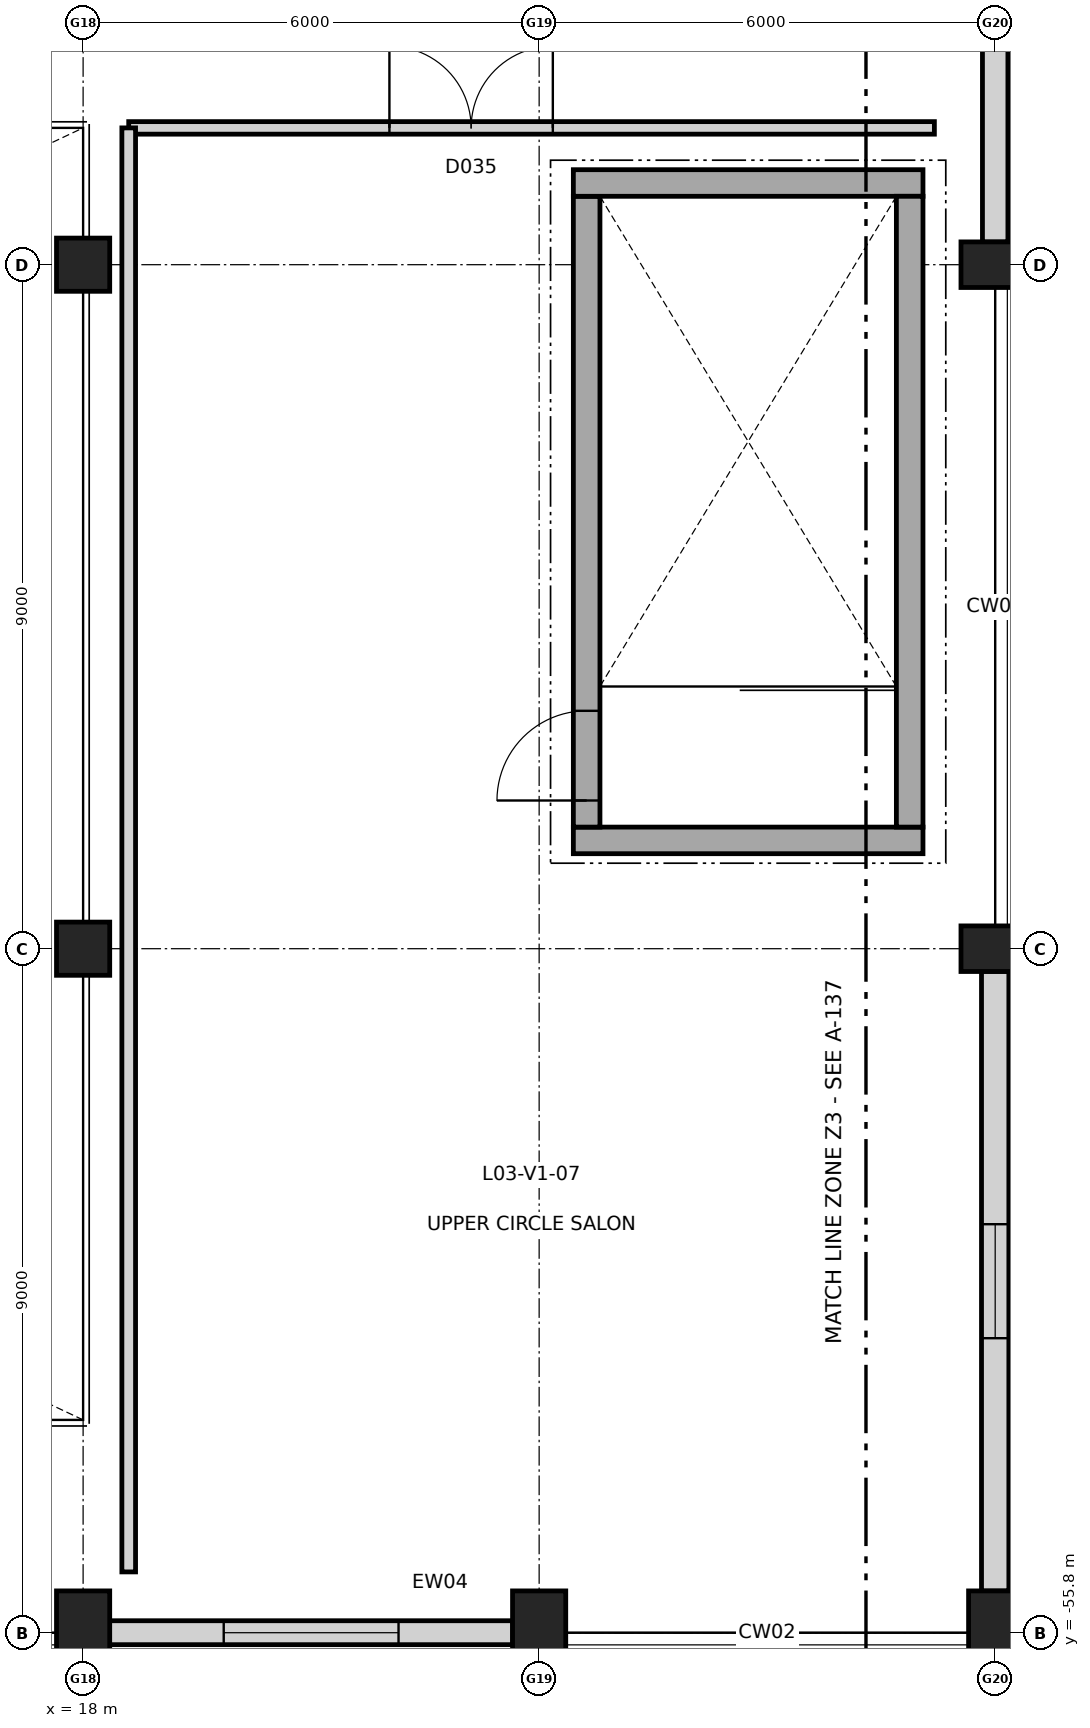
"""IFC4 building model, lengths in metres.
Left out: names, types, materials, properties, quantities, classifications, styles, units other than length and angle.
Written with IfcOpenShell. Run it as: python <this file> out.ifc"""

import sys

from ifc_helpers import new_model, si_unit, direction, frame, frame_2d, origin, origin_2d, place, context, subcontext, project, spatial, rectangle, circle, extrude, element, fill, save


model = new_model("IFC4")
c1 = context("Model", 3, precision=1e-05, world=origin(), true_north=direction((0.0, 1.0)))
c2 = subcontext(c1, "Body", "Model", "MODEL_VIEW")
j1 = project(units=[si_unit("LENGTHUNIT", "METRE"), si_unit("PLANEANGLEUNIT", "RADIAN")], contexts=[c1])
p1 = place(None, origin())
s1 = spatial("IfcSite", under=j1, at=p1, CompositionType="ELEMENT")
p2 = place(p1, origin())
s2 = spatial("IfcBuilding", under=s1, at=p2, CompositionType="ELEMENT")
p3 = place(p2, frame((0.0, 0.0, 15.0)))
s3 = spatial("IfcBuildingStorey", under=s2, at=p3, CompositionType="ELEMENT", Elevation=15.0)
p4 = place(p3, frame((18.0, -55.8, 0.0), z_axis=(0.0, 0.0, 1.0), x_axis=(1.0, 0.0, 0.0)))
e1 = element("IfcColumn", 1, at=p4, inside=s3, PredefinedType="COLUMN", context=c2, shape_type="SweptSolid", body=[
    extrude(rectangle(XDim=0.7, YDim=1.1, at=origin_2d()), origin(), (0.0, 0.0, 1.0), 4.8),
])
for number, where, z_axis, x_axis in (
    (2, (18.0, -46.8, 0.0), (0.0, 0.0, 1.0), (1.0, 0.0, 0.0)),
    (3, (18.0, -37.8, 0.0), (0.0, 0.0, 1.0), (1.0, 0.0, 0.0)),
):
    element("IfcColumn", number, at=place(p3, frame(where, z_axis=z_axis, x_axis=x_axis)), inside=s3, PredefinedType="COLUMN", context=c2, shape_type="SweptSolid", body=[
        extrude(circle(Radius=0.35, at=origin_2d()), origin(), (0.0, 0.0, 1.0), 4.8),
    ])
for number, where, z_axis, x_axis in (
    (4, (24.0, -55.8, 0.0), (0.0, 0.0, 1.0), (1.0, 0.0, 0.0)),
    (5, (30.0, -55.8, 0.0), (0.0, 0.0, 1.0), (1.0, 0.0, 0.0)),
):
    element("IfcColumn", number, at=place(p3, frame(where, z_axis=z_axis, x_axis=x_axis)), inside=s3, PredefinedType="COLUMN", context=c2, shape_type="SweptSolid", body=[
        extrude(rectangle(XDim=0.7, YDim=1.1, at=origin_2d()), origin(), (0.0, 0.0, 1.0), 4.8),
    ])
for number, where, z_axis, x_axis in (
    (6, (30.0, -46.8, 0.0), (0.0, 0.0, 1.0), (0.0, 1.0, 0.0)),
    (7, (30.0, -37.8, 0.0), (0.0, 0.0, 1.0), (0.0, 1.0, 0.0)),
):
    element("IfcColumn", number, at=place(p3, frame(where, z_axis=z_axis, x_axis=x_axis)), inside=s3, PredefinedType="COLUMN", context=c2, shape_type="SweptSolid", body=[
        extrude(rectangle(XDim=0.6, YDim=0.9, at=origin_2d()), origin(), (0.0, 0.0, 1.0), 4.8),
    ])
p5 = place(p3, frame((23.652, -55.8, 0.0), z_axis=(0.0, 0.0, 1.0), x_axis=(-1.0, 0.0, 0.0)))
e8 = element("IfcWall", 8, at=p5, inside=s3, PredefinedType="STANDARD", context=c2, shape_type="SweptSolid", body=[
    extrude(rectangle(XDim=5.304, YDim=0.315, at=frame_2d((2.652, 0.0))), origin(), (0.0, 0.0, 1.0), 3.745),
])
p6 = place(p5, frame((1.502, 0.0, 0.85)))
e9 = element("IfcOpeningElement", 9, at=p6, cuts=e8, PredefinedType="OPENING", context=c2, shape_type="SweptSolid", body=[
    extrude(rectangle(XDim=2.3, YDim=1.85, at=frame_2d((1.15, 0.925))), frame((0.0, 0.167, 0.0), z_axis=(0.0, -1.0, 0.0), x_axis=(1.0, 0.0, 0.0)), (0.0, 0.0, 1.0), 0.335),
])
p7 = place(p3, frame((30.0, -29.098, 0.0), z_axis=(0.0, 0.0, 1.0), x_axis=(0.0, -1.0, 0.0)))
e10 = element("IfcWall", 10, at=p7, inside=s3, PredefinedType="STANDARD", context=c2, shape_type="SweptSolid", body=[
    extrude(rectangle(XDim=8.404, YDim=0.335, at=frame_2d((4.202, 0.0))), origin(), (0.0, 0.0, 1.0), 3.829),
])
p8 = place(p7, frame((2.652, 0.0, 0.85)))
e11 = element("IfcOpeningElement", 11, at=p8, cuts=e10, PredefinedType="OPENING", context=c2, shape_type="SweptSolid", body=[
    extrude(rectangle(XDim=3.1, YDim=2.1, at=frame_2d((1.55, 1.05))), frame((0.0, 0.177, 0.0), z_axis=(0.0, -1.0, 0.0), x_axis=(1.0, 0.0, 0.0)), (0.0, 0.0, 1.0), 0.355),
])
p9 = place(p3, frame((30.0, -47.098, 0.0), z_axis=(0.0, 0.0, 1.0), x_axis=(0.0, -1.0, 0.0)))
e12 = element("IfcWall", 12, at=p9, inside=s3, PredefinedType="STANDARD", context=c2, shape_type="SweptSolid", body=[
    extrude(rectangle(XDim=8.154, YDim=0.36, at=frame_2d((4.077, 0.0))), origin(), (0.0, 0.0, 1.0), 3.829),
])
p10 = place(p9, frame((3.327, 0.0, 0.6)))
e13 = element("IfcOpeningElement", 13, at=p10, cuts=e12, PredefinedType="OPENING", context=c2, shape_type="SweptSolid", body=[
    extrude(rectangle(XDim=1.5, YDim=2.35, at=frame_2d((0.75, 1.175))), frame((0.0, 0.19, 0.0), z_axis=(0.0, -1.0, 0.0), x_axis=(1.0, 0.0, 0.0)), (0.0, 0.0, 1.0), 0.38),
])
p11 = place(p3, frame((29.05, -45.375, 0.0), z_axis=(0.0, 0.0, 1.0), x_axis=(-1.0, 0.0, 0.0)))
e14 = element("IfcWall", 14, at=p11, inside=s3, PredefinedType="SHEAR", context=c2, shape_type="SweptSolid", body=[
    extrude(rectangle(XDim=4.6, YDim=0.35, at=frame_2d((2.3, 0.0))), origin(), (0.0, 0.0, 1.0), 4.8),
])
p12 = place(p3, frame((24.625, -45.2, 0.0), z_axis=(0.0, 0.0, 1.0), x_axis=(0.0, 1.0, 0.0)))
e15 = element("IfcWall", 15, at=p12, inside=s3, PredefinedType="SHEAR", context=c2, shape_type="SweptSolid", body=[
    extrude(rectangle(XDim=8.3, YDim=0.35, at=frame_2d((4.15, 0.0))), origin(), (0.0, 0.0, 1.0), 4.8),
])
p13 = place(p12, frame((0.35, 0.0, 0.0)))
e16 = element("IfcOpeningElement", 16, at=p13, cuts=e15, PredefinedType="OPENING", context=c2, shape_type="SweptSolid", body=[
    extrude(rectangle(XDim=1.18, YDim=2.15, at=frame_2d((0.59, 1.075))), frame((0.0, 0.185, 0.0), z_axis=(0.0, -1.0, 0.0), x_axis=(1.0, 0.0, 0.0)), (0.0, 0.0, 1.0), 0.37),
])
p14 = place(p3, frame((24.45, -36.725, 0.0), z_axis=(0.0, 0.0, 1.0), x_axis=(1.0, 0.0, 0.0)))
e17 = element("IfcWall", 17, at=p14, inside=s3, PredefinedType="SHEAR", context=c2, shape_type="SweptSolid", body=[
    extrude(rectangle(XDim=4.6, YDim=0.35, at=frame_2d((2.3, 0.0))), origin(), (0.0, 0.0, 1.0), 4.8),
])
p15 = place(p3, frame((28.875, -36.9, 0.0), z_axis=(0.0, 0.0, 1.0), x_axis=(0.0, -1.0, 0.0)))
e18 = element("IfcWall", 18, at=p15, inside=s3, PredefinedType="SHEAR", context=c2, shape_type="SweptSolid", body=[
    extrude(rectangle(XDim=8.3, YDim=0.35, at=frame_2d((4.15, 0.0))), origin(), (0.0, 0.0, 1.0), 4.8),
])
p16 = place(p3, frame((18.6, -36.0, 0.0), z_axis=(0.0, 0.0, 1.0), x_axis=(1.0, 0.0, 0.0)))
e19 = element("IfcWall", 19, at=p16, inside=s3, PredefinedType="PARTITIONING", context=c2, shape_type="SweptSolid", body=[
    extrude(rectangle(XDim=10.6, YDim=0.165, at=frame_2d((5.3, 0.0))), origin(), (0.0, 0.0, 1.0), 4.42),
])
p17 = place(p16, frame((3.43, 0.0, 0.0)))
e20 = element("IfcOpeningElement", 20, at=p17, cuts=e19, PredefinedType="OPENING", context=c2, shape_type="SweptSolid", body=[
    extrude(rectangle(XDim=2.15, YDim=2.4, at=frame_2d((1.075, 1.2))), frame((0.0, 0.093, 0.0), z_axis=(0.0, -1.0, 0.0), x_axis=(1.0, 0.0, 0.0)), (0.0, 0.0, 1.0), 0.185),
])
p18 = place(p3, frame((18.6, -55.0, 0.0), z_axis=(0.0, 0.0, 1.0), x_axis=(0.0, 1.0, 0.0)))
e21 = element("IfcWall", 21, at=p18, inside=s3, PredefinedType="PARTITIONING", context=c2, shape_type="SweptSolid", body=[
    extrude(rectangle(XDim=19.0, YDim=0.18, at=frame_2d((9.5, 0.0))), origin(), (0.0, 0.0, 1.0), 4.42),
])
p19 = place(p6, origin())
e22 = element("IfcWindow", 22, at=p19, inside=s3, PartitioningType="SINGLE_PANEL", PredefinedType="WINDOW", context=c2, shape_type="SweptSolid", body=[
    extrude(rectangle(XDim=2.3, YDim=1.85, at=frame_2d((1.15, 0.925))), frame((0.0, 0.03, 0.0), z_axis=(0.0, -1.0, 0.0), x_axis=(1.0, 0.0, 0.0)), (0.0, 0.0, 1.0), 0.06),
])
fill(e9, e22)
p20 = place(p10, origin())
e23 = element("IfcWindow", 23, at=p20, inside=s3, PartitioningType="SINGLE_PANEL", PredefinedType="WINDOW", context=c2, shape_type="SweptSolid", body=[
    extrude(rectangle(XDim=1.5, YDim=2.35, at=frame_2d((0.75, 1.175))), frame((0.0, 0.03, 0.0), z_axis=(0.0, -1.0, 0.0), x_axis=(1.0, 0.0, 0.0)), (0.0, 0.0, 1.0), 0.06),
])
fill(e13, e23)
p21 = place(p13, origin())
e24 = element("IfcDoor", 24, at=p21, inside=s3, OperationType="SINGLE_SWING_LEFT", PredefinedType="DOOR", context=c2, shape_type="SweptSolid", body=[
    extrude(rectangle(XDim=1.18, YDim=2.15, at=frame_2d((0.59, 1.075))), frame((0.0, 0.025, 0.0), z_axis=(0.0, -1.0, 0.0), x_axis=(1.0, 0.0, 0.0)), (0.0, 0.0, 1.0), 0.05),
])
fill(e16, e24)
p22 = place(p17, origin())
e25 = element("IfcDoor", 25, at=p22, inside=s3, OperationType="DOUBLE_DOOR_SINGLE_SWING", PredefinedType="DOOR", context=c2, shape_type="SweptSolid", body=[
    extrude(rectangle(XDim=2.15, YDim=2.4, at=frame_2d((1.075, 1.2))), frame((0.0, 0.025, 0.0), z_axis=(0.0, -1.0, 0.0), x_axis=(1.0, 0.0, 0.0)), (0.0, 0.0, 1.0), 0.05),
])
fill(e20, e25)
save(model, sys.argv[1])
